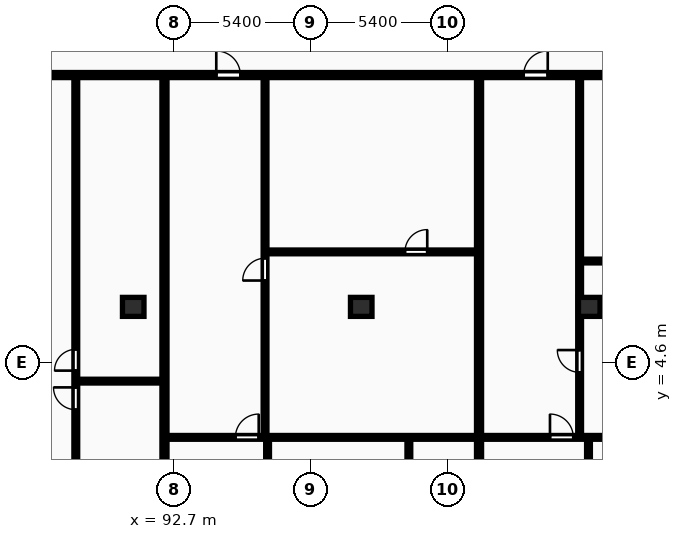
"""IFC4 building model, lengths in metres.
Left out: names, types, materials, properties, quantities, classifications, styles, units other than length and angle.
Written with IfcOpenShell. Run it as: python <this file> out.ifc"""

import sys

from ifc_helpers import new_model, si_unit, direction, frame, frame_2d, origin, origin_2d, place, context, subcontext, project, spatial, rectangle, extrude, element, fill, save


model = new_model("IFC4")
c1 = context("Model", 3, precision=1e-05, world=origin(), true_north=direction((0.0, 1.0)))
c2 = subcontext(c1, "Body", "Model", "MODEL_VIEW")
j1 = project(units=[si_unit("LENGTHUNIT", "METRE"), si_unit("PLANEANGLEUNIT", "RADIAN")], contexts=[c1])
p1 = place(None, origin())
s1 = spatial("IfcSite", under=j1, at=p1, CompositionType="ELEMENT")
p2 = place(p1, origin())
s2 = spatial("IfcBuilding", under=s1, at=p2, CompositionType="ELEMENT")
p3 = place(p2, frame((0.0, 0.0, 106.8)))
s3 = spatial("IfcBuildingStorey", under=s2, at=p3, CompositionType="ELEMENT", Elevation=106.8)
for number, where, z_axis, x_axis in (
    (1, (91.1, 6.8, 0.0), (0.0, 0.0, 1.0), (1.0, 0.0, 0.0)),
    (2, (100.1, 6.8, 0.0), (0.0, 0.0, 1.0), (1.0, 0.0, 0.0)),
    (3, (109.1, 6.8, 0.0), (0.0, 0.0, 1.0), (1.0, 0.0, 0.0)),
):
    element("IfcColumn", number, at=place(p3, frame(where, z_axis=z_axis, x_axis=x_axis)), inside=s3, PredefinedType="COLUMN", context=c2, shape_type="SweptSolid", body=[
        extrude(rectangle(XDim=0.85, YDim=0.75, at=origin_2d()), origin(), (0.0, 0.0, 1.0), 3.25),
    ])
p4 = place(p3, frame((92.333, -8.7, 0.0), z_axis=(0.0, 0.0, 1.0), x_axis=(0.0, 1.0, 0.0)))
e4 = element("IfcWall", 4, at=p4, inside=s3, PredefinedType="PARTITIONING", context=c2, shape_type="SweptSolid", body=[
    extrude(rectangle(XDim=24.57, YDim=0.2, at=frame_2d((12.285, 0.0))), origin(), (0.0, 0.0, 1.0), 2.97),
])
p5 = place(p3, frame((88.893, 3.87, 0.0), z_axis=(0.0, 0.0, 1.0), x_axis=(1.0, 0.0, 0.0)))
e5 = element("IfcWall", 5, at=p5, inside=s3, PredefinedType="PARTITIONING", context=c2, shape_type="SweptSolid", body=[
    extrude(rectangle(XDim=3.36, YDim=0.15, at=frame_2d((1.68, 0.0))), origin(), (0.0, 0.0, 1.0), 2.97),
])
p6 = place(p3, frame((88.833, -3.39, 0.0), z_axis=(0.0, 0.0, 1.0), x_axis=(0.0, 1.0, 0.0)))
e6 = element("IfcWall", 6, at=p6, inside=s3, PredefinedType="PARTITIONING", context=c2, shape_type="SweptSolid", body=[
    extrude(rectangle(XDim=19.28, YDim=0.15, at=frame_2d((9.64, 0.0))), origin(), (0.0, 0.0, 1.0), 2.97),
])
p7 = place(p6, frame((2.406, 0.0, 0.0)))
e7 = element("IfcOpeningElement", 7, at=p7, cuts=e6, PredefinedType="OPENING", context=c2, shape_type="SweptSolid", body=[
    extrude(rectangle(XDim=0.96, YDim=2.1, at=frame_2d((0.48, 1.05))), frame((0.0, 0.085, 0.0), z_axis=(0.0, -1.0, 0.0), x_axis=(1.0, 0.0, 0.0)), (0.0, 0.0, 1.0), 0.17),
])
p8 = place(p6, frame((6.133, 0.0, 0.0)))
e8 = element("IfcOpeningElement", 8, at=p8, cuts=e6, PredefinedType="OPENING", context=c2, shape_type="SweptSolid", body=[
    extrude(rectangle(XDim=0.88, YDim=2.06, at=frame_2d((0.44, 1.03))), frame((0.0, 0.085, 0.0), z_axis=(0.0, -1.0, 0.0), x_axis=(1.0, 0.0, 0.0)), (0.0, 0.0, 1.0), 0.17),
])
p9 = place(p6, frame((7.674, 0.0, 0.0)))
e9 = element("IfcOpeningElement", 9, at=p9, cuts=e6, PredefinedType="OPENING", context=c2, shape_type="SweptSolid", body=[
    extrude(rectangle(XDim=0.84, YDim=2.04, at=frame_2d((0.42, 1.02))), frame((0.0, 0.085, 0.0), z_axis=(0.0, -1.0, 0.0), x_axis=(1.0, 0.0, 0.0)), (0.0, 0.0, 1.0), 0.17),
])
p10 = place(p3, frame((104.75, -8.7, 0.0), z_axis=(0.0, 0.0, 1.0), x_axis=(0.0, 1.0, 0.0)))
e10 = element("IfcWall", 10, at=p10, inside=s3, PredefinedType="PARTITIONING", context=c2, shape_type="SweptSolid", body=[
    extrude(rectangle(XDim=24.57, YDim=0.2, at=frame_2d((12.285, 0.0))), origin(), (0.0, 0.0, 1.0), 2.97),
])
p11 = place(p3, frame((96.363, 8.97, 0.0), z_axis=(0.0, 0.0, 1.0), x_axis=(1.0, 0.0, 0.0)))
e11 = element("IfcWall", 11, at=p11, inside=s3, PredefinedType="PARTITIONING", context=c2, shape_type="SweptSolid", body=[
    extrude(rectangle(XDim=8.307, YDim=0.15, at=frame_2d((4.153, 0.0))), origin(), (0.0, 0.0, 1.0), 2.97),
])
p12 = place(p11, frame((5.462, 0.0, 0.0)))
e12 = element("IfcOpeningElement", 12, at=p12, cuts=e11, PredefinedType="OPENING", context=c2, shape_type="SweptSolid", body=[
    extrude(rectangle(XDim=0.88, YDim=2.06, at=frame_2d((0.44, 1.03))), frame((0.0, 0.085, 0.0), z_axis=(0.0, -1.0, 0.0), x_axis=(1.0, 0.0, 0.0)), (0.0, 0.0, 1.0), 0.17),
])
p13 = place(p3, frame((96.303, 1.69, 0.0), z_axis=(0.0, 0.0, 1.0), x_axis=(0.0, 1.0, 0.0)))
e13 = element("IfcWall", 13, at=p13, inside=s3, PredefinedType="PARTITIONING", context=c2, shape_type="SweptSolid", body=[
    extrude(rectangle(XDim=14.2, YDim=0.15, at=frame_2d((7.1, 0.0))), origin(), (0.0, 0.0, 1.0), 2.97),
])
p14 = place(p13, frame((6.15, 0.0, 0.0)))
e14 = element("IfcOpeningElement", 14, at=p14, cuts=e13, PredefinedType="OPENING", context=c2, shape_type="SweptSolid", body=[
    extrude(rectangle(XDim=0.88, YDim=2.06, at=frame_2d((0.44, 1.03))), frame((0.0, 0.085, 0.0), z_axis=(0.0, -1.0, 0.0), x_axis=(1.0, 0.0, 0.0)), (0.0, 0.0, 1.0), 0.17),
])
p15 = place(p3, frame((96.403, -3.39, 0.0), z_axis=(0.0, 0.0, 1.0), x_axis=(0.0, 1.0, 0.0)))
e15 = element("IfcWall", 15, at=p15, inside=s3, PredefinedType="PARTITIONING", context=c2, shape_type="SweptSolid", body=[
    extrude(rectangle(XDim=5.0, YDim=0.15, at=frame_2d((2.5, 0.0))), origin(), (0.0, 0.0, 1.0), 2.97),
])
p16 = place(p15, frame((2.06, 0.0, 0.0)))
e16 = element("IfcOpeningElement", 16, at=p16, cuts=e15, PredefinedType="OPENING", context=c2, shape_type="SweptSolid", body=[
    extrude(rectangle(XDim=0.88, YDim=2.06, at=frame_2d((0.44, 1.03))), frame((0.0, 0.085, 0.0), z_axis=(0.0, -1.0, 0.0), x_axis=(1.0, 0.0, 0.0)), (0.0, 0.0, 1.0), 0.17),
])
p17 = place(p3, frame((101.98, -8.7, 0.0), z_axis=(0.0, 0.0, 1.0), x_axis=(0.0, 1.0, 0.0)))
e17 = element("IfcWall", 17, at=p17, inside=s3, PredefinedType="PARTITIONING", context=c2, shape_type="SweptSolid", body=[
    extrude(rectangle(XDim=10.31, YDim=0.15, at=frame_2d((5.155, 0.0))), origin(), (0.0, 0.0, 1.0), 2.97),
])
p18 = place(p17, frame((6.12, 0.0, 0.0)))
e18 = element("IfcOpeningElement", 18, at=p18, cuts=e17, PredefinedType="OPENING", context=c2, shape_type="SweptSolid", body=[
    extrude(rectangle(XDim=0.84, YDim=2.04, at=frame_2d((0.42, 1.02))), frame((0.0, 0.085, 0.0), z_axis=(0.0, -1.0, 0.0), x_axis=(1.0, 0.0, 0.0)), (0.0, 0.0, 1.0), 0.17),
])
p19 = place(p17, frame((8.04, 0.0, 0.0)))
e19 = element("IfcOpeningElement", 19, at=p19, cuts=e17, PredefinedType="OPENING", context=c2, shape_type="SweptSolid", body=[
    extrude(rectangle(XDim=0.84, YDim=2.04, at=frame_2d((0.42, 1.02))), frame((0.0, 0.085, 0.0), z_axis=(0.0, -1.0, 0.0), x_axis=(1.0, 0.0, 0.0)), (0.0, 0.0, 1.0), 0.17),
])
p20 = place(p17, frame((2.001, 0.0, 0.0)))
e20 = element("IfcOpeningElement", 20, at=p20, cuts=e17, PredefinedType="OPENING", context=c2, shape_type="SweptSolid", body=[
    extrude(rectangle(XDim=0.88, YDim=2.06, at=frame_2d((0.44, 1.03))), frame((0.0, 0.085, 0.0), z_axis=(0.0, -1.0, 0.0), x_axis=(1.0, 0.0, 0.0)), (0.0, 0.0, 1.0), 0.17),
])
p21 = place(p3, frame((92.413, 1.65, 0.0), z_axis=(0.0, 0.0, 1.0), x_axis=(1.0, 0.0, 0.0)))
e21 = element("IfcWall", 21, at=p21, inside=s3, PredefinedType="PARTITIONING", context=c2, shape_type="SweptSolid", body=[
    extrude(rectangle(XDim=12.257, YDim=0.15, at=frame_2d((6.128, 0.0))), origin(), (0.0, 0.0, 1.0), 2.97),
])
p22 = place(p21, frame((2.72, 0.0, 0.0)))
e22 = element("IfcOpeningElement", 22, at=p22, cuts=e21, PredefinedType="OPENING", context=c2, shape_type="SweptSolid", body=[
    extrude(rectangle(XDim=0.92, YDim=2.08, at=frame_2d((0.46, 1.04))), frame((0.0, 0.085, 0.0), z_axis=(0.0, -1.0, 0.0), x_axis=(1.0, 0.0, 0.0)), (0.0, 0.0, 1.0), 0.17),
])
p23 = place(p3, frame((108.78, 8.61, 0.0), z_axis=(0.0, 0.0, 1.0), x_axis=(1.0, 0.0, 0.0)))
e23 = element("IfcWall", 23, at=p23, inside=s3, PredefinedType="PARTITIONING", context=c2, shape_type="SweptSolid", body=[
    extrude(rectangle(XDim=9.723, YDim=0.15, at=frame_2d((4.862, 0.0))), origin(), (0.0, 0.0, 1.0), 2.97),
])
p24 = place(p23, frame((3.792, 0.0, 0.0)))
e24 = element("IfcOpeningElement", 24, at=p24, cuts=e23, PredefinedType="OPENING", context=c2, shape_type="SweptSolid", body=[
    extrude(rectangle(XDim=0.88, YDim=2.06, at=frame_2d((0.44, 1.03))), frame((0.0, 0.085, 0.0), z_axis=(0.0, -1.0, 0.0), x_axis=(1.0, 0.0, 0.0)), (0.0, 0.0, 1.0), 0.17),
])
p25 = place(p3, frame((108.72, 1.69, 0.0), z_axis=(0.0, 0.0, 1.0), x_axis=(0.0, 1.0, 0.0)))
e25 = element("IfcWall", 25, at=p25, inside=s3, PredefinedType="PARTITIONING", context=c2, shape_type="SweptSolid", body=[
    extrude(rectangle(XDim=14.2, YDim=0.15, at=frame_2d((7.1, 0.0))), origin(), (0.0, 0.0, 1.0), 2.97),
])
p26 = place(p25, frame((2.526, 0.0, 0.0)))
e26 = element("IfcOpeningElement", 26, at=p26, cuts=e25, PredefinedType="OPENING", context=c2, shape_type="SweptSolid", body=[
    extrude(rectangle(XDim=0.88, YDim=2.06, at=frame_2d((0.44, 1.03))), frame((0.0, 0.085, 0.0), z_axis=(0.0, -1.0, 0.0), x_axis=(1.0, 0.0, 0.0)), (0.0, 0.0, 1.0), 0.17),
])
p27 = place(p3, frame((109.07, -3.39, 0.0), z_axis=(0.0, 0.0, 1.0), x_axis=(0.0, 1.0, 0.0)))
e27 = element("IfcWall", 27, at=p27, inside=s3, PredefinedType="PARTITIONING", context=c2, shape_type="SweptSolid", body=[
    extrude(rectangle(XDim=5.0, YDim=0.15, at=frame_2d((2.5, 0.0))), origin(), (0.0, 0.0, 1.0), 2.2),
])
p28 = place(p27, frame((2.06, 0.0, 0.0)))
e28 = element("IfcOpeningElement", 28, at=p28, cuts=e27, PredefinedType="OPENING", context=c2, shape_type="SweptSolid", body=[
    extrude(rectangle(XDim=0.88, YDim=2.06, at=frame_2d((0.44, 1.03))), frame((0.0, 0.085, 0.0), z_axis=(0.0, -1.0, 0.0), x_axis=(1.0, 0.0, 0.0)), (0.0, 0.0, 1.0), 0.17),
])
p29 = place(p3, frame((104.83, 1.65, 0.0), z_axis=(0.0, 0.0, 1.0), x_axis=(1.0, 0.0, 0.0)))
e29 = element("IfcWall", 29, at=p29, inside=s3, PredefinedType="PARTITIONING", context=c2, shape_type="SweptSolid", body=[
    extrude(rectangle(XDim=13.673, YDim=0.15, at=frame_2d((6.837, 0.0))), origin(), (0.0, 0.0, 1.0), 2.97),
])
p30 = place(p29, frame((2.72, 0.0, 0.0)))
e30 = element("IfcOpeningElement", 30, at=p30, cuts=e29, PredefinedType="OPENING", context=c2, shape_type="SweptSolid", body=[
    extrude(rectangle(XDim=0.92, YDim=2.08, at=frame_2d((0.46, 1.04))), frame((0.0, 0.085, 0.0), z_axis=(0.0, -1.0, 0.0), x_axis=(1.0, 0.0, 0.0)), (0.0, 0.0, 1.0), 0.17),
])
p31 = place(p3, frame((72.7, 15.95, 0.0), z_axis=(0.0, 0.0, 1.0), x_axis=(1.0, 0.0, 0.0)))
e31 = element("IfcWall", 31, at=p31, inside=s3, PredefinedType="PARTITIONING", context=c2, shape_type="SweptSolid", body=[
    extrude(rectangle(XDim=58.0, YDim=0.2, at=frame_2d((29.0, 0.0))), origin(), (0.0, 0.0, 1.0), 2.97),
])
p32 = place(p31, frame((6.373, 0.0, 0.0)))
e32 = element("IfcOpeningElement", 32, at=p32, cuts=e31, PredefinedType="OPENING", context=c2, shape_type="SweptSolid", body=[
    extrude(rectangle(XDim=1.22, YDim=2.18, at=frame_2d((0.61, 1.09))), frame((0.0, 0.11, 0.0), z_axis=(0.0, -1.0, 0.0), x_axis=(1.0, 0.0, 0.0)), (0.0, 0.0, 1.0), 0.22),
])
p33 = place(p31, frame((21.678, 0.0, 0.0)))
e33 = element("IfcOpeningElement", 33, at=p33, cuts=e31, PredefinedType="OPENING", context=c2, shape_type="SweptSolid", body=[
    extrude(rectangle(XDim=0.95, YDim=2.15, at=frame_2d((0.475, 1.075))), frame((0.0, 0.11, 0.0), z_axis=(0.0, -1.0, 0.0), x_axis=(1.0, 0.0, 0.0)), (0.0, 0.0, 1.0), 0.22),
])
p34 = place(p31, frame((33.812, 0.0, 0.0)))
e34 = element("IfcOpeningElement", 34, at=p34, cuts=e31, PredefinedType="OPENING", context=c2, shape_type="SweptSolid", body=[
    extrude(rectangle(XDim=0.95, YDim=2.15, at=frame_2d((0.475, 1.075))), frame((0.0, 0.11, 0.0), z_axis=(0.0, -1.0, 0.0), x_axis=(1.0, 0.0, 0.0)), (0.0, 0.0, 1.0), 0.22),
])
p35 = place(p31, frame((47.928, 0.0, 0.0)))
e35 = element("IfcOpeningElement", 35, at=p35, cuts=e31, PredefinedType="OPENING", context=c2, shape_type="SweptSolid", body=[
    extrude(rectangle(XDim=0.95, YDim=2.15, at=frame_2d((0.475, 1.075))), frame((0.0, 0.11, 0.0), z_axis=(0.0, -1.0, 0.0), x_axis=(1.0, 0.0, 0.0)), (0.0, 0.0, 1.0), 0.22),
])
p36 = place(p8, origin())
e36 = element("IfcDoor", 36, at=p36, inside=s3, OperationType="SINGLE_SWING_RIGHT", PredefinedType="DOOR", context=c2, shape_type="SweptSolid", body=[
    extrude(rectangle(XDim=0.88, YDim=2.06, at=frame_2d((0.44, 1.03))), frame((0.0, 0.025, 0.0), z_axis=(0.0, -1.0, 0.0), x_axis=(1.0, 0.0, 0.0)), (0.0, 0.0, 1.0), 0.05),
])
fill(e8, e36)
p37 = place(p9, origin())
e37 = element("IfcDoor", 37, at=p37, inside=s3, OperationType="SINGLE_SWING_LEFT", PredefinedType="DOOR", context=c2, shape_type="SweptSolid", body=[
    extrude(rectangle(XDim=0.84, YDim=2.04, at=frame_2d((0.42, 1.02))), frame((0.0, 0.025, 0.0), z_axis=(0.0, -1.0, 0.0), x_axis=(1.0, 0.0, 0.0)), (0.0, 0.0, 1.0), 0.05),
])
fill(e9, e37)
p38 = place(p12, origin())
e38 = element("IfcDoor", 38, at=p38, inside=s3, OperationType="SINGLE_SWING_RIGHT", PredefinedType="DOOR", context=c2, shape_type="SweptSolid", body=[
    extrude(rectangle(XDim=0.88, YDim=2.06, at=frame_2d((0.44, 1.03))), frame((0.0, 0.025, 0.0), z_axis=(0.0, -1.0, 0.0), x_axis=(1.0, 0.0, 0.0)), (0.0, 0.0, 1.0), 0.05),
])
fill(e12, e38)
p39 = place(p14, origin())
e39 = element("IfcDoor", 39, at=p39, inside=s3, OperationType="SINGLE_SWING_LEFT", PredefinedType="DOOR", context=c2, shape_type="SweptSolid", body=[
    extrude(rectangle(XDim=0.88, YDim=2.06, at=frame_2d((0.44, 1.03))), frame((0.0, 0.025, 0.0), z_axis=(0.0, -1.0, 0.0), x_axis=(1.0, 0.0, 0.0)), (0.0, 0.0, 1.0), 0.05),
])
fill(e14, e39)
p40 = place(p22, origin())
e40 = element("IfcDoor", 40, at=p40, inside=s3, OperationType="SINGLE_SWING_RIGHT", PredefinedType="DOOR", context=c2, shape_type="SweptSolid", body=[
    extrude(rectangle(XDim=0.92, YDim=2.08, at=frame_2d((0.46, 1.04))), frame((0.0, 0.025, 0.0), z_axis=(0.0, -1.0, 0.0), x_axis=(1.0, 0.0, 0.0)), (0.0, 0.0, 1.0), 0.05),
])
fill(e22, e40)
p41 = place(p26, origin())
e41 = element("IfcDoor", 41, at=p41, inside=s3, OperationType="SINGLE_SWING_RIGHT", PredefinedType="DOOR", context=c2, shape_type="SweptSolid", body=[
    extrude(rectangle(XDim=0.88, YDim=2.06, at=frame_2d((0.44, 1.03))), frame((0.0, 0.025, 0.0), z_axis=(0.0, -1.0, 0.0), x_axis=(1.0, 0.0, 0.0)), (0.0, 0.0, 1.0), 0.05),
])
fill(e26, e41)
p42 = place(p30, origin())
e42 = element("IfcDoor", 42, at=p42, inside=s3, OperationType="SINGLE_SWING_LEFT", PredefinedType="DOOR", context=c2, shape_type="SweptSolid", body=[
    extrude(rectangle(XDim=0.92, YDim=2.08, at=frame_2d((0.46, 1.04))), frame((0.0, 0.025, 0.0), z_axis=(0.0, -1.0, 0.0), x_axis=(1.0, 0.0, 0.0)), (0.0, 0.0, 1.0), 0.05),
])
fill(e30, e42)
p43 = place(p33, origin())
e43 = element("IfcDoor", 43, at=p43, inside=s3, OperationType="SINGLE_SWING_LEFT", PredefinedType="DOOR", context=c2, shape_type="SweptSolid", body=[
    extrude(rectangle(XDim=0.95, YDim=2.15, at=frame_2d((0.475, 1.075))), frame((0.0, 0.025, 0.0), z_axis=(0.0, -1.0, 0.0), x_axis=(1.0, 0.0, 0.0)), (0.0, 0.0, 1.0), 0.05),
])
fill(e33, e43)
p44 = place(p34, origin())
e44 = element("IfcDoor", 44, at=p44, inside=s3, OperationType="SINGLE_SWING_RIGHT", PredefinedType="DOOR", context=c2, shape_type="SweptSolid", body=[
    extrude(rectangle(XDim=0.95, YDim=2.15, at=frame_2d((0.475, 1.075))), frame((0.0, 0.025, 0.0), z_axis=(0.0, -1.0, 0.0), x_axis=(1.0, 0.0, 0.0)), (0.0, 0.0, 1.0), 0.05),
])
fill(e34, e44)
save(model, sys.argv[1])
